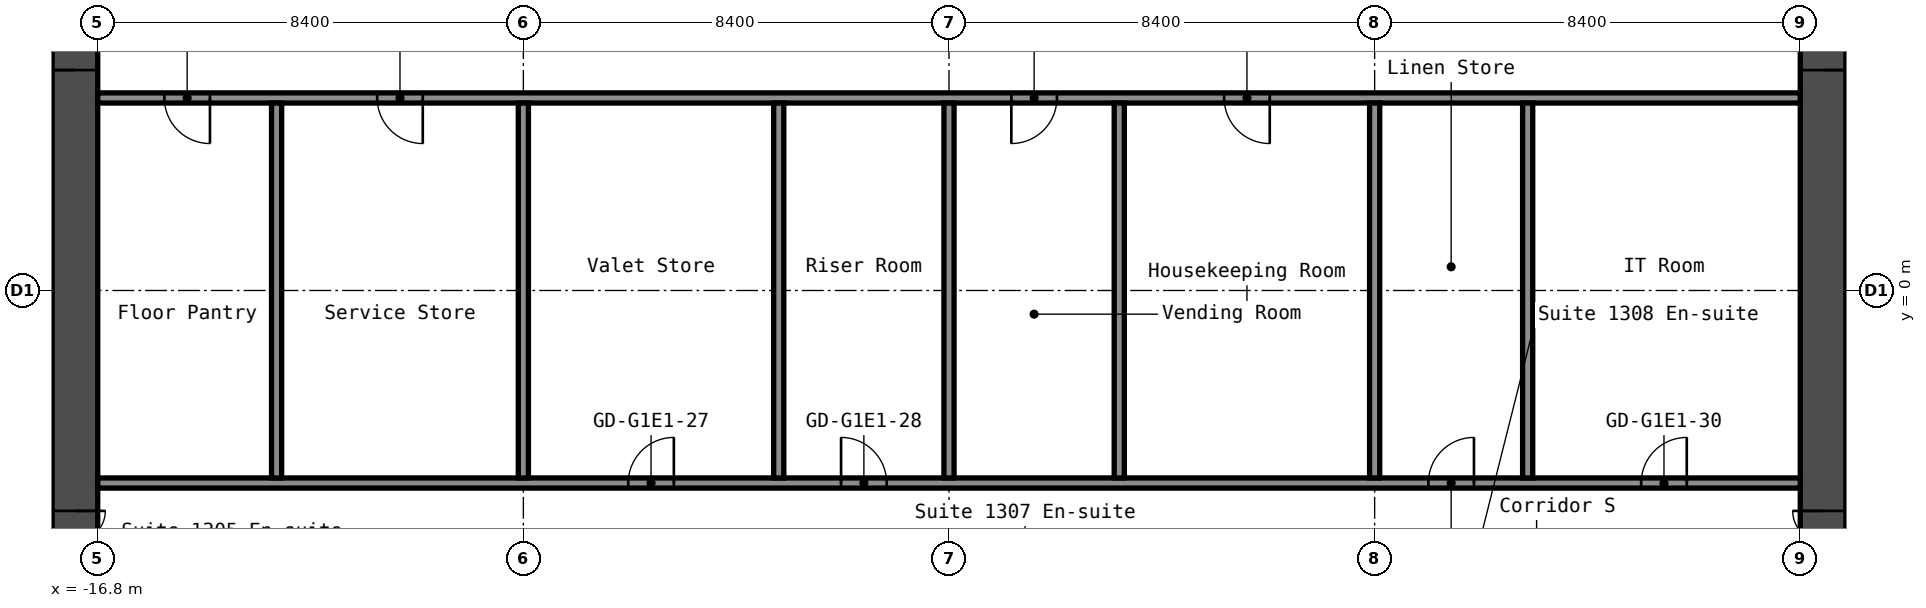
"""IFC4 building model, lengths in metres.
Left out: names, types, materials, properties, quantities, classifications, styles, units other than length and angle.
Written with IfcOpenShell. Run it as: python <this file> out.ifc"""

import sys

from ifc_helpers import new_model, si_unit, direction, frame, frame_2d, origin, place, context, subcontext, project, spatial, rectangle, extrude, element, fill, save


model = new_model("IFC4")
c1 = context("Model", 3, precision=1e-05, world=origin(), true_north=direction((0.0, 1.0)))
c2 = subcontext(c1, "Body", "Model", "MODEL_VIEW")
j1 = project(units=[si_unit("LENGTHUNIT", "METRE"), si_unit("PLANEANGLEUNIT", "RADIAN")], contexts=[c1])
p1 = place(None, origin())
s1 = spatial("IfcSite", under=j1, at=p1, CompositionType="ELEMENT")
p2 = place(p1, origin())
s2 = spatial("IfcBuilding", under=s1, at=p2, CompositionType="ELEMENT")
p3 = place(p2, frame((0.0, 0.0, 48.6)))
s3 = spatial("IfcBuildingStorey", under=s2, at=p3, CompositionType="ELEMENT", Elevation=48.6)
p4 = place(p3, frame((-17.25, -8.4, 0.0), z_axis=(0.0, 0.0, 1.0), x_axis=(0.0, 1.0, 0.0)))
e1 = element("IfcWall", 1, at=p4, inside=s3, PredefinedType="SHEAR", context=c2, shape_type="SweptSolid", body=[
    extrude(rectangle(XDim=16.8, YDim=0.9, at=frame_2d((8.4, 0.0))), origin(), (0.0, 0.0, 1.0), 2.8),
])
p5 = place(p4, frame((12.75, 0.0, 0.0)))
e2 = element("IfcOpeningElement", 2, at=p5, cuts=e1, PredefinedType="OPENING", context=c2, shape_type="SweptSolid", body=[
    extrude(rectangle(XDim=1.2, YDim=2.1, at=frame_2d((0.6, 1.05))), frame((0.0, 0.46, 0.0), z_axis=(0.0, -1.0, 0.0), x_axis=(1.0, 0.0, 0.0)), (0.0, 0.0, 1.0), 0.92),
])
p6 = place(p4, frame((2.85, 0.0, 0.0)))
e3 = element("IfcOpeningElement", 3, at=p6, cuts=e1, PredefinedType="OPENING", context=c2, shape_type="SweptSolid", body=[
    extrude(rectangle(XDim=1.2, YDim=2.1, at=frame_2d((0.6, 1.05))), frame((0.0, 0.46, 0.0), z_axis=(0.0, -1.0, 0.0), x_axis=(1.0, 0.0, 0.0)), (0.0, 0.0, 1.0), 0.92),
])
p7 = place(p3, frame((17.25, -8.4, 0.0), z_axis=(0.0, 0.0, 1.0), x_axis=(0.0, 1.0, 0.0)))
e4 = element("IfcWall", 4, at=p7, inside=s3, PredefinedType="SHEAR", context=c2, shape_type="SweptSolid", body=[
    extrude(rectangle(XDim=16.8, YDim=0.9, at=frame_2d((8.4, 0.0))), origin(), (0.0, 0.0, 1.0), 2.8),
])
p8 = place(p7, frame((12.75, 0.0, 0.0)))
e5 = element("IfcOpeningElement", 5, at=p8, cuts=e4, PredefinedType="OPENING", context=c2, shape_type="SweptSolid", body=[
    extrude(rectangle(XDim=1.2, YDim=2.1, at=frame_2d((0.6, 1.05))), frame((0.0, 0.46, 0.0), z_axis=(0.0, -1.0, 0.0), x_axis=(1.0, 0.0, 0.0)), (0.0, 0.0, 1.0), 0.92),
])
p9 = place(p7, frame((2.85, 0.0, 0.0)))
e6 = element("IfcOpeningElement", 6, at=p9, cuts=e4, PredefinedType="OPENING", context=c2, shape_type="SweptSolid", body=[
    extrude(rectangle(XDim=1.2, YDim=2.1, at=frame_2d((0.6, 1.05))), frame((0.0, 0.46, 0.0), z_axis=(0.0, -1.0, 0.0), x_axis=(1.0, 0.0, 0.0)), (0.0, 0.0, 1.0), 0.92),
])
p10 = place(p3, frame((-16.8, -3.8, 0.0), z_axis=(0.0, 0.0, 1.0), x_axis=(1.0, 0.0, 0.0)))
e7 = element("IfcWall", 7, at=p10, inside=s3, PredefinedType="PARTITIONING", context=c2, shape_type="SweptSolid", body=[
    extrude(rectangle(XDim=33.6, YDim=0.2, at=frame_2d((16.8, 0.0))), origin(), (0.0, 0.0, 1.0), 2.8),
])
p11 = place(p10, frame((10.47, 0.0, 0.0)))
e8 = element("IfcOpeningElement", 8, at=p11, cuts=e7, PredefinedType="OPENING", context=c2, shape_type="SweptSolid", body=[
    extrude(rectangle(XDim=0.9, YDim=2.1, at=frame_2d((0.45, 1.05))), frame((0.0, 0.11, 0.0), z_axis=(0.0, -1.0, 0.0), x_axis=(1.0, 0.0, 0.0)), (0.0, 0.0, 1.0), 0.22),
])
p12 = place(p10, frame((14.67, 0.0, 0.0)))
e9 = element("IfcOpeningElement", 9, at=p12, cuts=e7, PredefinedType="OPENING", context=c2, shape_type="SweptSolid", body=[
    extrude(rectangle(XDim=0.9, YDim=2.1, at=frame_2d((0.45, 1.05))), frame((0.0, 0.11, 0.0), z_axis=(0.0, -1.0, 0.0), x_axis=(1.0, 0.0, 0.0)), (0.0, 0.0, 1.0), 0.22),
])
p13 = place(p10, frame((26.26, 0.0, 0.0)))
e10 = element("IfcOpeningElement", 10, at=p13, cuts=e7, PredefinedType="OPENING", context=c2, shape_type="SweptSolid", body=[
    extrude(rectangle(XDim=0.9, YDim=2.1, at=frame_2d((0.45, 1.05))), frame((0.0, 0.11, 0.0), z_axis=(0.0, -1.0, 0.0), x_axis=(1.0, 0.0, 0.0)), (0.0, 0.0, 1.0), 0.22),
])
p14 = place(p10, frame((30.46, 0.0, 0.0)))
e11 = element("IfcOpeningElement", 11, at=p14, cuts=e7, PredefinedType="OPENING", context=c2, shape_type="SweptSolid", body=[
    extrude(rectangle(XDim=0.9, YDim=2.1, at=frame_2d((0.45, 1.05))), frame((0.0, 0.11, 0.0), z_axis=(0.0, -1.0, 0.0), x_axis=(1.0, 0.0, 0.0)), (0.0, 0.0, 1.0), 0.22),
])
p15 = place(p3, frame((-16.8, 3.8, 0.0), z_axis=(0.0, 0.0, 1.0), x_axis=(1.0, 0.0, 0.0)))
e12 = element("IfcWall", 12, at=p15, inside=s3, PredefinedType="PARTITIONING", context=c2, shape_type="SweptSolid", body=[
    extrude(rectangle(XDim=33.6, YDim=0.2, at=frame_2d((16.8, 0.0))), origin(), (0.0, 0.0, 1.0), 2.8),
])
p16 = place(p15, frame((1.315, 0.0, 0.0)))
e13 = element("IfcOpeningElement", 13, at=p16, cuts=e12, PredefinedType="OPENING", context=c2, shape_type="SweptSolid", body=[
    extrude(rectangle(XDim=0.9, YDim=2.1, at=frame_2d((0.45, 1.05))), frame((0.0, 0.11, 0.0), z_axis=(0.0, -1.0, 0.0), x_axis=(1.0, 0.0, 0.0)), (0.0, 0.0, 1.0), 0.22),
])
p17 = place(p15, frame((5.515, 0.0, 0.0)))
e14 = element("IfcOpeningElement", 14, at=p17, cuts=e12, PredefinedType="OPENING", context=c2, shape_type="SweptSolid", body=[
    extrude(rectangle(XDim=0.9, YDim=2.1, at=frame_2d((0.45, 1.05))), frame((0.0, 0.11, 0.0), z_axis=(0.0, -1.0, 0.0), x_axis=(1.0, 0.0, 0.0)), (0.0, 0.0, 1.0), 0.22),
])
p18 = place(p15, frame((18.03, 0.0, 0.0)))
e15 = element("IfcOpeningElement", 15, at=p18, cuts=e12, PredefinedType="OPENING", context=c2, shape_type="SweptSolid", body=[
    extrude(rectangle(XDim=0.9, YDim=2.1, at=frame_2d((0.45, 1.05))), frame((0.0, 0.11, 0.0), z_axis=(0.0, -1.0, 0.0), x_axis=(1.0, 0.0, 0.0)), (0.0, 0.0, 1.0), 0.22),
])
p19 = place(p15, frame((22.23, 0.0, 0.0)))
e16 = element("IfcOpeningElement", 16, at=p19, cuts=e12, PredefinedType="OPENING", context=c2, shape_type="SweptSolid", body=[
    extrude(rectangle(XDim=0.9, YDim=2.1, at=frame_2d((0.45, 1.05))), frame((0.0, 0.11, 0.0), z_axis=(0.0, -1.0, 0.0), x_axis=(1.0, 0.0, 0.0)), (0.0, 0.0, 1.0), 0.22),
])
for number, where, z_axis, x_axis in (
    (17, (-13.27, -3.7, 0.0), (0.0, 0.0, 1.0), (0.0, 1.0, 0.0)),
    (18, (-8.4, -3.7, 0.0), (0.0, 0.0, 1.0), (0.0, 1.0, 0.0)),
    (19, (-3.36, -3.7, 0.0), (0.0, 0.0, 1.0), (0.0, 1.0, 0.0)),
    (20, (0.0, -3.7, 0.0), (0.0, 0.0, 1.0), (0.0, 1.0, 0.0)),
    (21, (3.36, -3.7, 0.0), (0.0, 0.0, 1.0), (0.0, 1.0, 0.0)),
    (22, (8.4, -3.7, 0.0), (0.0, 0.0, 1.0), (0.0, 1.0, 0.0)),
    (23, (11.42, -3.7, 0.0), (0.0, 0.0, 1.0), (0.0, 1.0, 0.0)),
):
    element("IfcWall", number, at=place(p3, frame(where, z_axis=z_axis, x_axis=x_axis)), inside=s3, PredefinedType="PARTITIONING", context=c2, shape_type="SweptSolid", body=[
        extrude(rectangle(XDim=7.4, YDim=0.2, at=frame_2d((3.7, 0.0))), origin(), (0.0, 0.0, 1.0), 2.8),
    ])
p20 = place(p5, origin())
e24 = element("IfcDoor", 24, at=p20, inside=s3, OperationType="DOUBLE_DOOR_SINGLE_SWING", PredefinedType="DOOR", context=c2, shape_type="SweptSolid", body=[
    extrude(rectangle(XDim=1.2, YDim=2.1, at=frame_2d((0.6, 1.05))), frame((0.0, 0.025, 0.0), z_axis=(0.0, -1.0, 0.0), x_axis=(1.0, 0.0, 0.0)), (0.0, 0.0, 1.0), 0.05),
])
fill(e2, e24)
p21 = place(p6, origin())
e25 = element("IfcDoor", 25, at=p21, inside=s3, OperationType="DOUBLE_DOOR_SINGLE_SWING", PredefinedType="DOOR", context=c2, shape_type="SweptSolid", body=[
    extrude(rectangle(XDim=1.2, YDim=2.1, at=frame_2d((0.6, 1.05))), frame((0.0, 0.025, 0.0), z_axis=(0.0, -1.0, 0.0), x_axis=(1.0, 0.0, 0.0)), (0.0, 0.0, 1.0), 0.05),
])
fill(e3, e25)
p22 = place(p8, origin())
e26 = element("IfcDoor", 26, at=p22, inside=s3, OperationType="DOUBLE_DOOR_SINGLE_SWING", PredefinedType="DOOR", context=c2, shape_type="SweptSolid", body=[
    extrude(rectangle(XDim=1.2, YDim=2.1, at=frame_2d((0.6, 1.05))), frame((0.0, 0.025, 0.0), z_axis=(0.0, -1.0, 0.0), x_axis=(1.0, 0.0, 0.0)), (0.0, 0.0, 1.0), 0.05),
])
fill(e5, e26)
p23 = place(p9, origin())
e27 = element("IfcDoor", 27, at=p23, inside=s3, OperationType="DOUBLE_DOOR_SINGLE_SWING", PredefinedType="DOOR", context=c2, shape_type="SweptSolid", body=[
    extrude(rectangle(XDim=1.2, YDim=2.1, at=frame_2d((0.6, 1.05))), frame((0.0, 0.025, 0.0), z_axis=(0.0, -1.0, 0.0), x_axis=(1.0, 0.0, 0.0)), (0.0, 0.0, 1.0), 0.05),
])
fill(e6, e27)
p24 = place(p11, origin())
e28 = element("IfcDoor", 28, at=p24, inside=s3, OperationType="SINGLE_SWING_LEFT", PredefinedType="DOOR", context=c2, shape_type="SweptSolid", body=[
    extrude(rectangle(XDim=0.9, YDim=2.1, at=frame_2d((0.45, 1.05))), frame((0.0, 0.025, 0.0), z_axis=(0.0, -1.0, 0.0), x_axis=(1.0, 0.0, 0.0)), (0.0, 0.0, 1.0), 0.05),
])
fill(e8, e28)
p25 = place(p12, origin())
e29 = element("IfcDoor", 29, at=p25, inside=s3, OperationType="SINGLE_SWING_RIGHT", PredefinedType="DOOR", context=c2, shape_type="SweptSolid", body=[
    extrude(rectangle(XDim=0.9, YDim=2.1, at=frame_2d((0.45, 1.05))), frame((0.0, 0.025, 0.0), z_axis=(0.0, -1.0, 0.0), x_axis=(1.0, 0.0, 0.0)), (0.0, 0.0, 1.0), 0.05),
])
fill(e9, e29)
p26 = place(p13, origin())
e30 = element("IfcDoor", 30, at=p26, inside=s3, OperationType="SINGLE_SWING_LEFT", PredefinedType="DOOR", context=c2, shape_type="SweptSolid", body=[
    extrude(rectangle(XDim=0.9, YDim=2.1, at=frame_2d((0.45, 1.05))), frame((0.0, 0.025, 0.0), z_axis=(0.0, -1.0, 0.0), x_axis=(1.0, 0.0, 0.0)), (0.0, 0.0, 1.0), 0.05),
])
fill(e10, e30)
p27 = place(p14, origin())
e31 = element("IfcDoor", 31, at=p27, inside=s3, OperationType="SINGLE_SWING_LEFT", PredefinedType="DOOR", context=c2, shape_type="SweptSolid", body=[
    extrude(rectangle(XDim=0.9, YDim=2.1, at=frame_2d((0.45, 1.05))), frame((0.0, 0.025, 0.0), z_axis=(0.0, -1.0, 0.0), x_axis=(1.0, 0.0, 0.0)), (0.0, 0.0, 1.0), 0.05),
])
fill(e11, e31)
p28 = place(p16, origin())
e32 = element("IfcDoor", 32, at=p28, inside=s3, OperationType="SINGLE_SWING_RIGHT", PredefinedType="DOOR", context=c2, shape_type="SweptSolid", body=[
    extrude(rectangle(XDim=0.9, YDim=2.1, at=frame_2d((0.45, 1.05))), frame((0.0, 0.025, 0.0), z_axis=(0.0, -1.0, 0.0), x_axis=(1.0, 0.0, 0.0)), (0.0, 0.0, 1.0), 0.05),
])
fill(e13, e32)
p29 = place(p17, origin())
e33 = element("IfcDoor", 33, at=p29, inside=s3, OperationType="SINGLE_SWING_RIGHT", PredefinedType="DOOR", context=c2, shape_type="SweptSolid", body=[
    extrude(rectangle(XDim=0.9, YDim=2.1, at=frame_2d((0.45, 1.05))), frame((0.0, 0.025, 0.0), z_axis=(0.0, -1.0, 0.0), x_axis=(1.0, 0.0, 0.0)), (0.0, 0.0, 1.0), 0.05),
])
fill(e14, e33)
p30 = place(p18, origin())
e34 = element("IfcDoor", 34, at=p30, inside=s3, OperationType="SINGLE_SWING_LEFT", PredefinedType="DOOR", context=c2, shape_type="SweptSolid", body=[
    extrude(rectangle(XDim=0.9, YDim=2.1, at=frame_2d((0.45, 1.05))), frame((0.0, 0.025, 0.0), z_axis=(0.0, -1.0, 0.0), x_axis=(1.0, 0.0, 0.0)), (0.0, 0.0, 1.0), 0.05),
])
fill(e15, e34)
p31 = place(p19, origin())
e35 = element("IfcDoor", 35, at=p31, inside=s3, OperationType="SINGLE_SWING_RIGHT", PredefinedType="DOOR", context=c2, shape_type="SweptSolid", body=[
    extrude(rectangle(XDim=0.9, YDim=2.1, at=frame_2d((0.45, 1.05))), frame((0.0, 0.025, 0.0), z_axis=(0.0, -1.0, 0.0), x_axis=(1.0, 0.0, 0.0)), (0.0, 0.0, 1.0), 0.05),
])
fill(e16, e35)
save(model, sys.argv[1])
